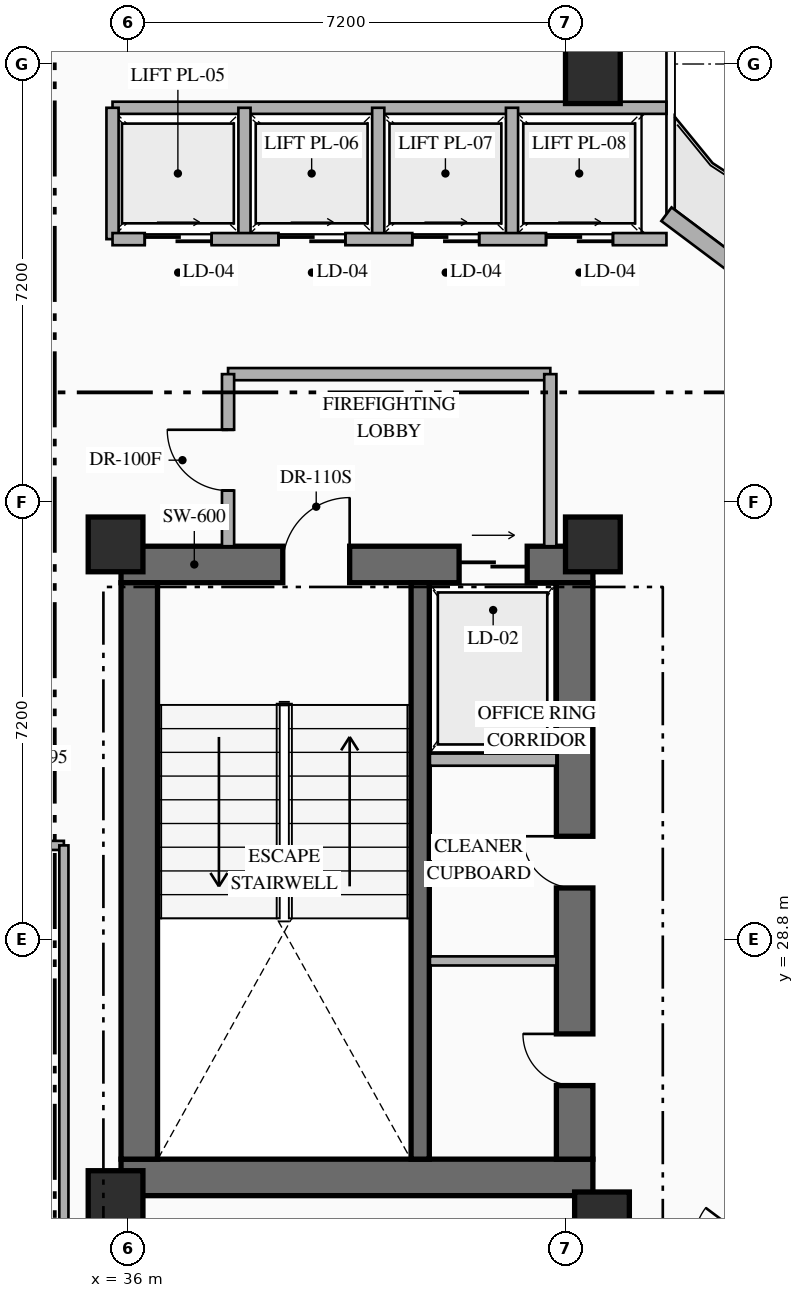
"""IFC4 building model, lengths in metres.
Left out: names, types, materials, properties, quantities, classifications, styles, units other than length and angle.
Written with IfcOpenShell. Run it as: python <this file> out.ifc"""

import sys

from ifc_helpers import new_model, si_unit, direction, frame, frame_2d, origin, origin_2d, place, context, subcontext, project, spatial, rectangle, extrude, element, fill, save


model = new_model("IFC4")
c1 = context("Model", 3, precision=1e-05, world=origin(), true_north=direction((0.0, 1.0)))
c2 = subcontext(c1, "Body", "Model", "MODEL_VIEW")
j1 = project(units=[si_unit("LENGTHUNIT", "METRE"), si_unit("PLANEANGLEUNIT", "RADIAN")], contexts=[c1])
p1 = place(None, origin())
s1 = spatial("IfcSite", under=j1, at=p1, CompositionType="ELEMENT")
p2 = place(p1, origin())
s2 = spatial("IfcBuilding", under=s1, at=p2, CompositionType="ELEMENT")
p3 = place(p2, frame((0.0, 0.0, 112.05)))
s3 = spatial("IfcBuildingStorey", under=s2, at=p3, CompositionType="ELEMENT", Elevation=112.05)
p4 = place(p3, frame((35.89, 24.89, 0.0), z_axis=(0.0, 0.0, 1.0), x_axis=(1.0, 0.0, 0.0)))
e1 = element("IfcWall", 1, at=p4, inside=s3, PredefinedType="SHEAR", context=c2, shape_type="SweptSolid", body=[
    extrude(rectangle(XDim=7.76, YDim=0.6, at=frame_2d((3.88, 0.0))), origin(), (0.0, 0.0, 1.0), 3.6),
])
p5 = place(p3, frame((35.89, 34.97, 0.0), z_axis=(0.0, 0.0, 1.0), x_axis=(1.0, 0.0, 0.0)))
e2 = element("IfcWall", 2, at=p5, inside=s3, PredefinedType="SHEAR", context=c2, shape_type="SweptSolid", body=[
    extrude(rectangle(XDim=7.76, YDim=0.6, at=frame_2d((3.88, 0.0))), origin(), (0.0, 0.0, 1.0), 3.6),
])
p6 = place(p5, frame((2.66, 0.0, 0.0)))
e3 = element("IfcOpeningElement", 3, at=p6, cuts=e2, PredefinedType="OPENING", context=c2, shape_type="SweptSolid", body=[
    extrude(rectangle(XDim=1.1, YDim=2.2, at=frame_2d((0.55, 1.1))), frame((0.0, 0.31, 0.0), z_axis=(0.0, -1.0, 0.0), x_axis=(1.0, 0.0, 0.0)), (0.0, 0.0, 1.0), 0.62),
])
p7 = place(p5, frame((5.56, 0.0, 0.0)))
e4 = element("IfcOpeningElement", 4, at=p7, cuts=e2, PredefinedType="OPENING", context=c2, shape_type="SweptSolid", body=[
    extrude(rectangle(XDim=1.12, YDim=2.15, at=frame_2d((0.56, 1.075))), frame((0.0, 0.31, 0.0), z_axis=(0.0, -1.0, 0.0), x_axis=(1.0, 0.0, 0.0)), (0.0, 0.0, 1.0), 0.62),
])
p8 = place(p3, frame((36.19, 25.19, 0.0), z_axis=(0.0, 0.0, 1.0), x_axis=(0.0, 1.0, 0.0)))
e5 = element("IfcWall", 5, at=p8, inside=s3, PredefinedType="SHEAR", context=c2, shape_type="SweptSolid", body=[
    extrude(rectangle(XDim=9.48, YDim=0.6, at=frame_2d((4.74, 0.0))), origin(), (0.0, 0.0, 1.0), 3.6),
])
p9 = place(p3, frame((43.35, 25.19, 0.0), z_axis=(0.0, 0.0, 1.0), x_axis=(0.0, 1.0, 0.0)))
e6 = element("IfcWall", 6, at=p9, inside=s3, PredefinedType="SHEAR", context=c2, shape_type="SweptSolid", body=[
    extrude(rectangle(XDim=9.48, YDim=0.6, at=frame_2d((4.74, 0.0))), origin(), (0.0, 0.0, 1.0), 3.6),
])
p10 = place(p9, frame((1.21, 0.0, 0.0)))
e7 = element("IfcOpeningElement", 7, at=p10, cuts=e6, PredefinedType="OPENING", context=c2, shape_type="SweptSolid", body=[
    extrude(rectangle(XDim=0.85, YDim=2.08, at=frame_2d((0.425, 1.04))), frame((0.0, 0.31, 0.0), z_axis=(0.0, -1.0, 0.0), x_axis=(1.0, 0.0, 0.0)), (0.0, 0.0, 1.0), 0.62),
])
p11 = place(p9, frame((4.46, 0.0, 0.0)))
e8 = element("IfcOpeningElement", 8, at=p11, cuts=e6, PredefinedType="OPENING", context=c2, shape_type="SweptSolid", body=[
    extrude(rectangle(XDim=0.85, YDim=2.08, at=frame_2d((0.425, 1.04))), frame((0.0, 0.31, 0.0), z_axis=(0.0, -1.0, 0.0), x_axis=(1.0, 0.0, 0.0)), (0.0, 0.0, 1.0), 0.62),
])
p12 = place(p3, frame((40.81, 25.19, 0.0), z_axis=(0.0, 0.0, 1.0), x_axis=(0.0, 1.0, 0.0)))
e9 = element("IfcWall", 9, at=p12, inside=s3, PredefinedType="SHEAR", context=c2, shape_type="SweptSolid", body=[
    extrude(rectangle(XDim=9.48, YDim=0.3, at=frame_2d((4.74, 0.0))), origin(), (0.0, 0.0, 1.0), 3.6),
])
for number, where, z_axis, x_axis in (
    (10, (35.8, 24.55, 0.0), (0.0, 0.0, 1.0), (1.0, 0.0, 0.0)),
    (11, (43.8, 24.2, 0.0), (0.0, 0.0, 1.0), (1.0, 0.0, 0.0)),
    (12, (35.8, 35.3, 0.0), (0.0, 0.0, 1.0), (1.0, 0.0, 0.0)),
    (13, (43.65, 35.3, 0.0), (0.0, 0.0, 1.0), (1.0, 0.0, 0.0)),
    (14, (43.65, 43.0, 0.0), (0.0, 0.0, 1.0), (1.0, 0.0, 0.0)),
):
    element("IfcColumn", number, at=place(p3, frame(where, z_axis=z_axis, x_axis=x_axis)), inside=s3, PredefinedType="COLUMN", context=c2, shape_type="SweptSolid", body=[
        extrude(rectangle(XDim=0.9, YDim=0.9, at=origin_2d()), origin(), (0.0, 0.0, 1.0), 3.6),
    ])
p13 = place(p3, frame((44.86, 40.73, 0.0), z_axis=(0.0, 0.0, 1.0), x_axis=(0.800006902154, -0.599990797017, 0.0)))
e15 = element("IfcWall", 15, at=p13, inside=s3, PredefinedType="STANDARD", context=c2, shape_type="SweptSolid", body=[
    extrude(rectangle(XDim=29.712, YDim=0.28, at=frame_2d((14.856, 0.0))), origin(), (0.0, 0.0, 1.0), 3.35),
])
p14 = place(p13, frame((14.249, 0.0, 0.0)))
e16 = element("IfcOpeningElement", 16, at=p14, cuts=e15, PredefinedType="OPENING", context=c2, shape_type="SweptSolid", body=[
    extrude(rectangle(XDim=1.1, YDim=2.2, at=frame_2d((0.55, 1.1))), frame((0.0, 0.15, 0.0), z_axis=(0.0, -1.0, 0.0), x_axis=(1.0, 0.0, 0.0)), (0.0, 0.0, 1.0), 0.3),
])
p15 = place(p13, frame((6.528, 0.0, 0.85)))
e17 = element("IfcOpeningElement", 17, at=p15, cuts=e15, PredefinedType="OPENING", context=c2, shape_type="SweptSolid", body=[
    extrude(rectangle(XDim=1.8, YDim=2.1, at=frame_2d((0.9, 1.05))), frame((0.0, 0.15, 0.0), z_axis=(0.0, -1.0, 0.0), x_axis=(1.0, 0.0, 0.0)), (0.0, 0.0, 1.0), 0.3),
])
p16 = place(p13, frame((21.384, 0.0, 0.85)))
e18 = element("IfcOpeningElement", 18, at=p16, cuts=e15, PredefinedType="OPENING", context=c2, shape_type="SweptSolid", body=[
    extrude(rectangle(XDim=1.8, YDim=2.1, at=frame_2d((0.9, 1.05))), frame((0.0, 0.15, 0.0), z_axis=(0.0, -1.0, 0.0), x_axis=(1.0, 0.0, 0.0)), (0.0, 0.0, 1.0), 0.3),
])
p17 = place(p3, frame((40.97, 31.76, 0.0), z_axis=(0.0, 0.0, 1.0), x_axis=(1.0, 0.0, 0.0)))
e19 = element("IfcWall", 19, at=p17, inside=s3, PredefinedType="STANDARD", context=c2, shape_type="SweptSolid", body=[
    extrude(rectangle(XDim=2.08, YDim=0.2, at=frame_2d((1.04, 0.0))), origin(), (0.0, 0.0, 1.0), 3.35),
])
p18 = place(p3, frame((40.97, 28.45, 0.0), z_axis=(0.0, 0.0, 1.0), x_axis=(1.0, 0.0, 0.0)))
e20 = element("IfcWall", 20, at=p18, inside=s3, PredefinedType="PARTITIONING", context=c2, shape_type="SweptSolid", body=[
    extrude(rectangle(XDim=2.08, YDim=0.15, at=frame_2d((1.04, 0.0))), origin(), (0.0, 0.0, 1.0), 3.35),
])
p19 = place(p3, frame((37.65, 38.1, 0.0), z_axis=(0.0, 0.0, 1.0), x_axis=(1.0, 0.0, 0.0)))
e21 = element("IfcWall", 21, at=p19, inside=s3, PredefinedType="STANDARD", context=c2, shape_type="SweptSolid", body=[
    extrude(rectangle(XDim=5.3, YDim=0.2, at=frame_2d((2.65, 0.0))), origin(), (0.0, 0.0, 1.0), 3.35),
])
p20 = place(p3, frame((42.95, 35.27, 0.0), z_axis=(0.0, 0.0, 1.0), x_axis=(0.0, 1.0, 0.0)))
e22 = element("IfcWall", 22, at=p20, inside=s3, PredefinedType="STANDARD", context=c2, shape_type="SweptSolid", body=[
    extrude(rectangle(XDim=2.83, YDim=0.2, at=frame_2d((1.415, 0.0))), origin(), (0.0, 0.0, 1.0), 3.35),
])
p21 = place(p3, frame((37.65, 35.27, 0.0), z_axis=(0.0, 0.0, 1.0), x_axis=(0.0, 1.0, 0.0)))
e23 = element("IfcWall", 23, at=p21, inside=s3, PredefinedType="STANDARD", context=c2, shape_type="SweptSolid", body=[
    extrude(rectangle(XDim=2.83, YDim=0.2, at=frame_2d((1.415, 0.0))), origin(), (0.0, 0.0, 1.0), 3.35),
])
p22 = place(p21, frame((0.915, 0.0, 0.0)))
e24 = element("IfcOpeningElement", 24, at=p22, cuts=e23, PredefinedType="OPENING", context=c2, shape_type="SweptSolid", body=[
    extrude(rectangle(XDim=1.0, YDim=2.2, at=frame_2d((0.5, 1.1))), frame((0.0, 0.11, 0.0), z_axis=(0.0, -1.0, 0.0), x_axis=(1.0, 0.0, 0.0)), (0.0, 0.0, 1.0), 0.22),
])
p23 = place(p3, frame((35.75, 42.48, 0.0), z_axis=(0.0, 0.0, 1.0), x_axis=(1.0, 0.0, 0.0)))
e25 = element("IfcWall", 25, at=p23, inside=s3, PredefinedType="STANDARD", context=c2, shape_type="SweptSolid", body=[
    extrude(rectangle(XDim=9.11, YDim=0.2, at=frame_2d((4.555, 0.0))), origin(), (0.0, 0.0, 1.0), 3.35),
])
for number, where, z_axis, x_axis in (
    (26, (35.75, 40.32, 0.0), (0.0, 0.0, 1.0), (0.0, 1.0, 0.0)),
    (27, (37.92, 40.32, 0.0), (0.0, 0.0, 1.0), (0.0, 1.0, 0.0)),
    (28, (40.12, 40.32, 0.0), (0.0, 0.0, 1.0), (0.0, 1.0, 0.0)),
    (29, (42.32, 40.32, 0.0), (0.0, 0.0, 1.0), (0.0, 1.0, 0.0)),
):
    element("IfcWall", number, at=place(p3, frame(where, z_axis=z_axis, x_axis=x_axis)), inside=s3, PredefinedType="STANDARD", context=c2, shape_type="SweptSolid", body=[
        extrude(rectangle(XDim=2.16, YDim=0.2, at=frame_2d((1.08, 0.0))), origin(), (0.0, 0.0, 1.0), 3.35),
    ])
p24 = place(p3, frame((35.75, 40.32, 0.0), z_axis=(0.0, 0.0, 1.0), x_axis=(1.0, 0.0, 0.0)))
e30 = element("IfcWall", 30, at=p24, inside=s3, PredefinedType="STANDARD", context=c2, shape_type="SweptSolid", body=[
    extrude(rectangle(XDim=9.11, YDim=0.2, at=frame_2d((4.555, 0.0))), origin(), (0.0, 0.0, 1.0), 3.35),
])
p25 = place(p24, frame((0.53, 0.0, 0.0)))
e31 = element("IfcOpeningElement", 31, at=p25, cuts=e30, PredefinedType="OPENING", context=c2, shape_type="SweptSolid", body=[
    extrude(rectangle(XDim=1.1, YDim=2.18, at=frame_2d((0.55, 1.09))), frame((0.0, 0.11, 0.0), z_axis=(0.0, -1.0, 0.0), x_axis=(1.0, 0.0, 0.0)), (0.0, 0.0, 1.0), 0.22),
])
p26 = place(p24, frame((2.73, 0.0, 0.0)))
e32 = element("IfcOpeningElement", 32, at=p26, cuts=e30, PredefinedType="OPENING", context=c2, shape_type="SweptSolid", body=[
    extrude(rectangle(XDim=1.1, YDim=2.18, at=frame_2d((0.55, 1.09))), frame((0.0, 0.11, 0.0), z_axis=(0.0, -1.0, 0.0), x_axis=(1.0, 0.0, 0.0)), (0.0, 0.0, 1.0), 0.22),
])
p27 = place(p24, frame((4.93, 0.0, 0.0)))
e33 = element("IfcOpeningElement", 33, at=p27, cuts=e30, PredefinedType="OPENING", context=c2, shape_type="SweptSolid", body=[
    extrude(rectangle(XDim=1.1, YDim=2.18, at=frame_2d((0.55, 1.09))), frame((0.0, 0.11, 0.0), z_axis=(0.0, -1.0, 0.0), x_axis=(1.0, 0.0, 0.0)), (0.0, 0.0, 1.0), 0.22),
])
p28 = place(p24, frame((7.13, 0.0, 0.0)))
e34 = element("IfcOpeningElement", 34, at=p28, cuts=e30, PredefinedType="OPENING", context=c2, shape_type="SweptSolid", body=[
    extrude(rectangle(XDim=1.1, YDim=2.18, at=frame_2d((0.55, 1.09))), frame((0.0, 0.11, 0.0), z_axis=(0.0, -1.0, 0.0), x_axis=(1.0, 0.0, 0.0)), (0.0, 0.0, 1.0), 0.22),
])
p29 = place(p3, frame((30.5, 30.35, 0.0), z_axis=(0.0, 0.0, 1.0), x_axis=(1.0, 0.0, 0.0)))
e35 = element("IfcWall", 35, at=p29, inside=s3, PredefinedType="PARTITIONING", context=c2, shape_type="SweptSolid", body=[
    extrude(rectangle(XDim=4.45, YDim=0.15, at=frame_2d((2.225, 0.0))), origin(), (0.0, 0.0, 1.0), 3.35),
])
p30 = place(p29, frame((2.846, 0.0, 0.0)))
e36 = element("IfcOpeningElement", 36, at=p30, cuts=e35, PredefinedType="OPENING", context=c2, shape_type="SweptSolid", body=[
    extrude(rectangle(XDim=0.95, YDim=2.15, at=frame_2d((0.475, 1.075))), frame((0.0, 0.085, 0.0), z_axis=(0.0, -1.0, 0.0), x_axis=(1.0, 0.0, 0.0)), (0.0, 0.0, 1.0), 0.17),
])
p31 = place(p3, frame((34.95, 23.2, 0.0), z_axis=(0.0, 0.0, 1.0), x_axis=(0.0, 1.0, 0.0)))
e37 = element("IfcWall", 37, at=p31, inside=s3, PredefinedType="PARTITIONING", context=c2, shape_type="SweptSolid", body=[
    extrude(rectangle(XDim=7.15, YDim=0.15, at=frame_2d((3.575, 0.0))), origin(), (0.0, 0.0, 1.0), 3.35),
])
p32 = place(p3, frame((44.24, 21.12, 0.0), z_axis=(0.0, 0.0, 1.0), x_axis=(0.600006735006, 0.799994948701, 0.0)))
e38 = element("IfcWall", 38, at=p32, inside=s3, PredefinedType="PARTITIONING", context=c2, shape_type="SweptSolid", body=[
    extrude(rectangle(XDim=5.8, YDim=0.15, at=frame_2d((2.9, 0.0))), origin(), (0.0, 0.0, 1.0), 3.35),
])
p33 = place(p32, frame((2.425, 0.0, 0.0)))
e39 = element("IfcOpeningElement", 39, at=p33, cuts=e38, PredefinedType="OPENING", context=c2, shape_type="SweptSolid", body=[
    extrude(rectangle(XDim=0.95, YDim=2.15, at=frame_2d((0.475, 1.075))), frame((0.0, 0.085, 0.0), z_axis=(0.0, -1.0, 0.0), x_axis=(1.0, 0.0, 0.0)), (0.0, 0.0, 1.0), 0.17),
])
p34 = place(p6, origin())
e40 = element("IfcDoor", 40, at=p34, inside=s3, OperationType="SINGLE_SWING_RIGHT", PredefinedType="DOOR", context=c2, shape_type="SweptSolid", body=[
    extrude(rectangle(XDim=1.1, YDim=2.2, at=frame_2d((0.55, 1.1))), frame((0.0, 0.025, 0.0), z_axis=(0.0, -1.0, 0.0), x_axis=(1.0, 0.0, 0.0)), (0.0, 0.0, 1.0), 0.05),
])
fill(e3, e40)
p35 = place(p7, origin())
e41 = element("IfcDoor", 41, at=p35, inside=s3, OperationType="SLIDING_TO_RIGHT", PredefinedType="USERDEFINED", context=c2, shape_type="SweptSolid", body=[
    extrude(rectangle(XDim=1.12, YDim=2.15, at=frame_2d((0.56, 1.075))), frame((0.0, 0.025, 0.0), z_axis=(0.0, -1.0, 0.0), x_axis=(1.0, 0.0, 0.0)), (0.0, 0.0, 1.0), 0.05),
])
fill(e4, e41)
p36 = place(p10, origin())
e42 = element("IfcDoor", 42, at=p36, inside=s3, OperationType="SINGLE_SWING_RIGHT", PredefinedType="DOOR", context=c2, shape_type="SweptSolid", body=[
    extrude(rectangle(XDim=0.85, YDim=2.08, at=frame_2d((0.425, 1.04))), frame((0.0, 0.025, 0.0), z_axis=(0.0, -1.0, 0.0), x_axis=(1.0, 0.0, 0.0)), (0.0, 0.0, 1.0), 0.05),
])
fill(e7, e42)
p37 = place(p11, origin())
e43 = element("IfcDoor", 43, at=p37, inside=s3, OperationType="SINGLE_SWING_RIGHT", PredefinedType="DOOR", context=c2, shape_type="SweptSolid", body=[
    extrude(rectangle(XDim=0.85, YDim=2.08, at=frame_2d((0.425, 1.04))), frame((0.0, 0.025, 0.0), z_axis=(0.0, -1.0, 0.0), x_axis=(1.0, 0.0, 0.0)), (0.0, 0.0, 1.0), 0.05),
])
fill(e8, e43)
p38 = place(p22, origin())
e44 = element("IfcDoor", 44, at=p38, inside=s3, OperationType="SINGLE_SWING_RIGHT", PredefinedType="DOOR", context=c2, shape_type="SweptSolid", body=[
    extrude(rectangle(XDim=1.0, YDim=2.2, at=frame_2d((0.5, 1.1))), frame((0.0, 0.025, 0.0), z_axis=(0.0, -1.0, 0.0), x_axis=(1.0, 0.0, 0.0)), (0.0, 0.0, 1.0), 0.05),
])
fill(e24, e44)
p39 = place(p25, origin())
e45 = element("IfcDoor", 45, at=p39, inside=s3, OperationType="SLIDING_TO_RIGHT", PredefinedType="USERDEFINED", context=c2, shape_type="SweptSolid", body=[
    extrude(rectangle(XDim=1.1, YDim=2.18, at=frame_2d((0.55, 1.09))), frame((0.0, 0.025, 0.0), z_axis=(0.0, -1.0, 0.0), x_axis=(1.0, 0.0, 0.0)), (0.0, 0.0, 1.0), 0.05),
])
fill(e31, e45)
p40 = place(p26, origin())
e46 = element("IfcDoor", 46, at=p40, inside=s3, OperationType="SLIDING_TO_RIGHT", PredefinedType="USERDEFINED", context=c2, shape_type="SweptSolid", body=[
    extrude(rectangle(XDim=1.1, YDim=2.18, at=frame_2d((0.55, 1.09))), frame((0.0, 0.025, 0.0), z_axis=(0.0, -1.0, 0.0), x_axis=(1.0, 0.0, 0.0)), (0.0, 0.0, 1.0), 0.05),
])
fill(e32, e46)
p41 = place(p27, origin())
e47 = element("IfcDoor", 47, at=p41, inside=s3, OperationType="SLIDING_TO_RIGHT", PredefinedType="USERDEFINED", context=c2, shape_type="SweptSolid", body=[
    extrude(rectangle(XDim=1.1, YDim=2.18, at=frame_2d((0.55, 1.09))), frame((0.0, 0.025, 0.0), z_axis=(0.0, -1.0, 0.0), x_axis=(1.0, 0.0, 0.0)), (0.0, 0.0, 1.0), 0.05),
])
fill(e33, e47)
p42 = place(p28, origin())
e48 = element("IfcDoor", 48, at=p42, inside=s3, OperationType="SLIDING_TO_RIGHT", PredefinedType="USERDEFINED", context=c2, shape_type="SweptSolid", body=[
    extrude(rectangle(XDim=1.1, YDim=2.18, at=frame_2d((0.55, 1.09))), frame((0.0, 0.025, 0.0), z_axis=(0.0, -1.0, 0.0), x_axis=(1.0, 0.0, 0.0)), (0.0, 0.0, 1.0), 0.05),
])
fill(e34, e48)
save(model, sys.argv[1])
